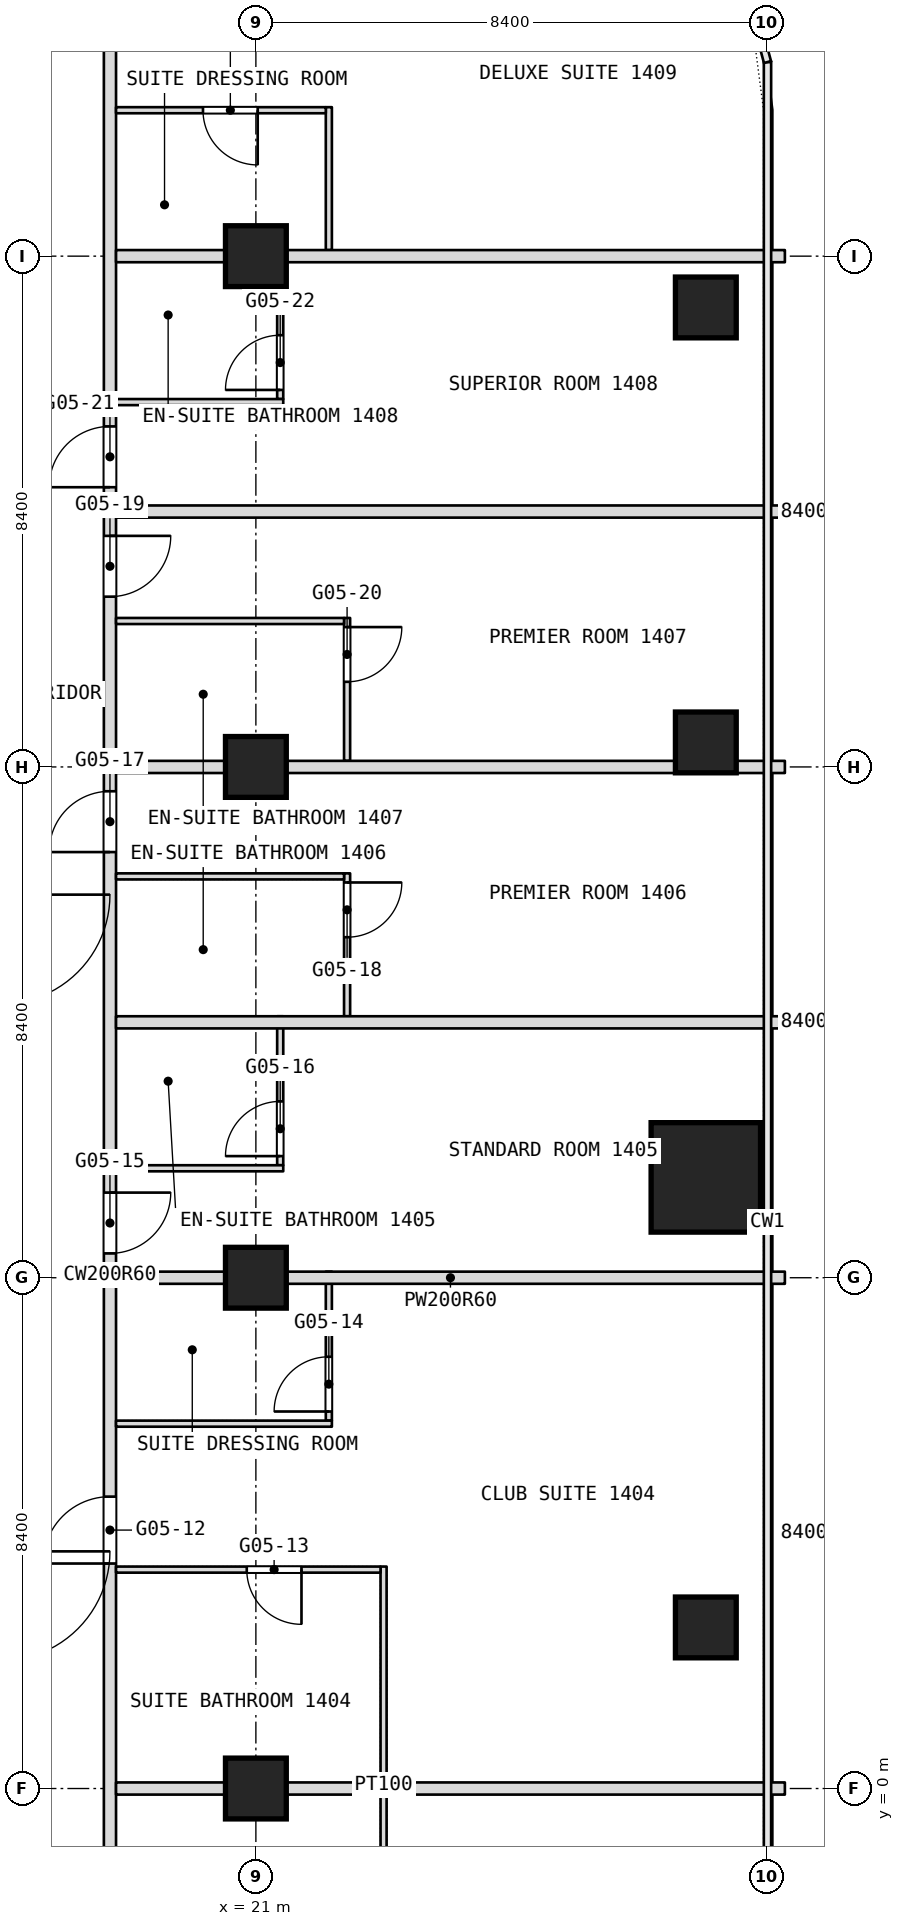
"""IFC4 building model, lengths in metres.
Left out: names, types, materials, properties, quantities, classifications, styles, units other than length and angle.
Written with IfcOpenShell. Run it as: python <this file> out.ifc"""

import sys

from ifc_helpers import new_model, si_unit, direction, frame, frame_2d, origin, origin_2d, place, context, subcontext, project, spatial, rectangle, extrude, element, fill, save


model = new_model("IFC4")
c1 = context("Model", 3, precision=1e-05, world=origin(), true_north=direction((0.0, 1.0)))
c2 = subcontext(c1, "Body", "Model", "MODEL_VIEW")
j1 = project(units=[si_unit("LENGTHUNIT", "METRE"), si_unit("PLANEANGLEUNIT", "RADIAN")], contexts=[c1])
p1 = place(None, origin())
s1 = spatial("IfcSite", under=j1, at=p1, CompositionType="ELEMENT")
p2 = place(p1, origin())
s2 = spatial("IfcBuilding", under=s1, at=p2, CompositionType="ELEMENT")
p3 = place(p2, frame((0.0, 0.0, 65.3)))
s3 = spatial("IfcBuildingStorey", under=s2, at=p3, CompositionType="ELEMENT", Elevation=65.3)
p4 = place(p3, frame((28.4, 10.05, 0.0), z_axis=(0.0, 0.0, 1.0), x_axis=(1.0, 0.0, 0.0)))
e1 = element("IfcColumn", 1, at=p4, inside=s3, PredefinedType="COLUMN", context=c2, shape_type="SweptSolid", body=[
    extrude(rectangle(XDim=1.8, YDim=1.8, at=origin_2d()), origin(), (0.0, 0.0, 1.0), 3.6),
])
for number, where, z_axis, x_axis in (
    (2, (21.0, 0.0, 0.0), (0.0, 0.0, 1.0), (1.0, 0.0, 0.0)),
    (3, (21.0, 8.4, 0.0), (0.0, 0.0, 1.0), (1.0, 0.0, 0.0)),
    (4, (21.0, 16.8, 0.0), (0.0, 0.0, 1.0), (1.0, 0.0, 0.0)),
    (5, (21.0, 25.2, 0.0), (0.0, 0.0, 1.0), (1.0, 0.0, 0.0)),
    (6, (28.4, 24.356, 0.0), (0.0, 0.0, 1.0), (1.0, 0.0, 0.0)),
    (7, (28.4, 17.203, 0.0), (0.0, 0.0, 1.0), (1.0, 0.0, 0.0)),
    (8, (28.4, 2.649, 0.0), (0.0, 0.0, 1.0), (1.0, 0.0, 0.0)),
):
    element("IfcColumn", number, at=place(p3, frame(where, z_axis=z_axis, x_axis=x_axis)), inside=s3, PredefinedType="COLUMN", context=c2, shape_type="SweptSolid", body=[
        extrude(rectangle(XDim=1.0, YDim=1.0, at=origin_2d()), origin(), (0.0, 0.0, 1.0), 3.6),
    ])
p5 = place(p3, frame((23.1, -3.55, 0.0), z_axis=(0.0, 0.0, 1.0), x_axis=(0.0, 1.0, 0.0)))
e9 = element("IfcWall", 9, at=p5, inside=s3, PredefinedType="PARTITIONING", context=c2, shape_type="SweptSolid", body=[
    extrude(rectangle(XDim=7.2, YDim=0.1, at=frame_2d((3.6, 0.0))), origin(), (0.0, 0.0, 1.0), 3.34),
])
p6 = place(p5, frame((0.15, 0.0, 0.0)))
e10 = element("IfcOpeningElement", 10, at=p6, cuts=e9, PredefinedType="OPENING", context=c2, shape_type="SweptSolid", body=[
    extrude(rectangle(XDim=0.9, YDim=2.1, at=frame_2d((0.45, 1.05))), frame((0.0, 0.05, 0.0), z_axis=(0.0, -1.0, 0.0), x_axis=(1.0, 0.0, 0.0)), (0.0, 0.0, 1.0), 0.1),
])
p7 = place(p3, frame((22.5, 12.7, 0.0), z_axis=(0.0, 0.0, 1.0), x_axis=(0.0, 1.0, 0.0)))
e11 = element("IfcWall", 11, at=p7, inside=s3, PredefinedType="PARTITIONING", context=c2, shape_type="SweptSolid", body=[
    extrude(rectangle(XDim=2.35, YDim=0.1, at=frame_2d((1.175, 0.0))), origin(), (0.0, 0.0, 1.0), 3.34),
])
p8 = place(p7, frame((1.3, 0.0, 0.0)))
e12 = element("IfcOpeningElement", 12, at=p8, cuts=e11, PredefinedType="OPENING", context=c2, shape_type="SweptSolid", body=[
    extrude(rectangle(XDim=0.9, YDim=2.1, at=frame_2d((0.45, 1.05))), frame((0.0, 0.05, 0.0), z_axis=(0.0, -1.0, 0.0), x_axis=(1.0, 0.0, 0.0)), (0.0, 0.0, 1.0), 0.1),
])
p9 = place(p3, frame((22.5, 16.9, 0.0), z_axis=(0.0, 0.0, 1.0), x_axis=(0.0, 1.0, 0.0)))
e13 = element("IfcWall", 13, at=p9, inside=s3, PredefinedType="PARTITIONING", context=c2, shape_type="SweptSolid", body=[
    extrude(rectangle(XDim=2.35, YDim=0.1, at=frame_2d((1.175, 0.0))), origin(), (0.0, 0.0, 1.0), 3.34),
])
p10 = place(p9, frame((1.3, 0.0, 0.0)))
e14 = element("IfcOpeningElement", 14, at=p10, cuts=e13, PredefinedType="OPENING", context=c2, shape_type="SweptSolid", body=[
    extrude(rectangle(XDim=0.9, YDim=2.1, at=frame_2d((0.45, 1.05))), frame((0.0, 0.05, 0.0), z_axis=(0.0, -1.0, 0.0), x_axis=(1.0, 0.0, 0.0)), (0.0, 0.0, 1.0), 0.1),
])
p11 = place(p3, frame((22.2, 6.05, 0.0), z_axis=(0.0, 0.0, 1.0), x_axis=(0.0, 1.0, 0.0)))
e15 = element("IfcWall", 15, at=p11, inside=s3, PredefinedType="PARTITIONING", context=c2, shape_type="SweptSolid", body=[
    extrude(rectangle(XDim=2.45, YDim=0.1, at=frame_2d((1.225, 0.0))), origin(), (0.0, 0.0, 1.0), 3.34),
])
p12 = place(p11, frame((0.15, 0.0, 0.0)))
e16 = element("IfcOpeningElement", 16, at=p12, cuts=e15, PredefinedType="OPENING", context=c2, shape_type="SweptSolid", body=[
    extrude(rectangle(XDim=0.9, YDim=2.1, at=frame_2d((0.45, 1.05))), frame((0.0, 0.05, 0.0), z_axis=(0.0, -1.0, 0.0), x_axis=(1.0, 0.0, 0.0)), (0.0, 0.0, 1.0), 0.1),
])
p13 = place(p3, frame((22.2, 25.3, 0.0), z_axis=(0.0, 0.0, 1.0), x_axis=(0.0, 1.0, 0.0)))
e17 = element("IfcWall", 17, at=p13, inside=s3, PredefinedType="PARTITIONING", context=c2, shape_type="SweptSolid", body=[
    extrude(rectangle(XDim=2.35, YDim=0.1, at=frame_2d((1.175, 0.0))), origin(), (0.0, 0.0, 1.0), 3.34),
])
p14 = place(p3, frame((21.4, 10.25, 0.0), z_axis=(0.0, 0.0, 1.0), x_axis=(0.0, 1.0, 0.0)))
e18 = element("IfcWall", 18, at=p14, inside=s3, PredefinedType="PARTITIONING", context=c2, shape_type="SweptSolid", body=[
    extrude(rectangle(XDim=2.45, YDim=0.1, at=frame_2d((1.225, 0.0))), origin(), (0.0, 0.0, 1.0), 3.34),
])
p15 = place(p14, frame((0.15, 0.0, 0.0)))
e19 = element("IfcOpeningElement", 19, at=p15, cuts=e18, PredefinedType="OPENING", context=c2, shape_type="SweptSolid", body=[
    extrude(rectangle(XDim=0.9, YDim=2.1, at=frame_2d((0.45, 1.05))), frame((0.0, 0.05, 0.0), z_axis=(0.0, -1.0, 0.0), x_axis=(1.0, 0.0, 0.0)), (0.0, 0.0, 1.0), 0.1),
])
p16 = place(p3, frame((21.4, 22.85, 0.0), z_axis=(0.0, 0.0, 1.0), x_axis=(0.0, 1.0, 0.0)))
e20 = element("IfcWall", 20, at=p16, inside=s3, PredefinedType="PARTITIONING", context=c2, shape_type="SweptSolid", body=[
    extrude(rectangle(XDim=2.45, YDim=0.1, at=frame_2d((1.225, 0.0))), origin(), (0.0, 0.0, 1.0), 3.34),
])
p17 = place(p16, frame((0.15, 0.0, 0.0)))
e21 = element("IfcOpeningElement", 21, at=p17, cuts=e20, PredefinedType="OPENING", context=c2, shape_type="SweptSolid", body=[
    extrude(rectangle(XDim=0.9, YDim=2.1, at=frame_2d((0.45, 1.05))), frame((0.0, 0.05, 0.0), z_axis=(0.0, -1.0, 0.0), x_axis=(1.0, 0.0, 0.0)), (0.0, 0.0, 1.0), 0.1),
])
p18 = place(p3, frame((18.6, -16.665, 0.0), z_axis=(0.0, 0.0, 1.0), x_axis=(0.0, 1.0, 0.0)))
e22 = element("IfcWall", 22, at=p18, inside=s3, PredefinedType="PARTITIONING", context=c2, shape_type="SweptSolid", body=[
    extrude(rectangle(XDim=50.205, YDim=0.2, at=frame_2d((25.103, 0.0))), origin(), (0.0, 0.0, 1.0), 3.34),
])
p19 = place(p18, frame((2.991, 0.0, 0.0)))
e23 = element("IfcOpeningElement", 23, at=p19, cuts=e22, PredefinedType="OPENING", context=c2, shape_type="SweptSolid", body=[
    extrude(rectangle(XDim=1.0, YDim=2.1, at=frame_2d((0.5, 1.05))), frame((0.0, 0.1, 0.0), z_axis=(0.0, -1.0, 0.0), x_axis=(1.0, 0.0, 0.0)), (0.0, 0.0, 1.0), 0.2),
])
p20 = place(p18, frame((4.574, 0.0, 0.0)))
e24 = element("IfcOpeningElement", 24, at=p20, cuts=e22, PredefinedType="OPENING", context=c2, shape_type="SweptSolid", body=[
    extrude(rectangle(XDim=1.0, YDim=2.1, at=frame_2d((0.5, 1.05))), frame((0.0, 0.1, 0.0), z_axis=(0.0, -1.0, 0.0), x_axis=(1.0, 0.0, 0.0)), (0.0, 0.0, 1.0), 0.2),
])
p21 = place(p18, frame((11.865, 0.0, 0.0)))
e25 = element("IfcOpeningElement", 25, at=p21, cuts=e22, PredefinedType="OPENING", context=c2, shape_type="SweptSolid", body=[
    extrude(rectangle(XDim=1.1, YDim=2.1, at=frame_2d((0.55, 1.05))), frame((0.0, 0.1, 0.0), z_axis=(0.0, -1.0, 0.0), x_axis=(1.0, 0.0, 0.0)), (0.0, 0.0, 1.0), 0.2),
])
p22 = place(p18, frame((20.365, 0.0, 0.0)))
e26 = element("IfcOpeningElement", 26, at=p22, cuts=e22, PredefinedType="OPENING", context=c2, shape_type="SweptSolid", body=[
    extrude(rectangle(XDim=1.1, YDim=2.1, at=frame_2d((0.55, 1.05))), frame((0.0, 0.1, 0.0), z_axis=(0.0, -1.0, 0.0), x_axis=(1.0, 0.0, 0.0)), (0.0, 0.0, 1.0), 0.2),
])
p23 = place(p18, frame((25.465, 0.0, 0.0)))
e27 = element("IfcOpeningElement", 27, at=p23, cuts=e22, PredefinedType="OPENING", context=c2, shape_type="SweptSolid", body=[
    extrude(rectangle(XDim=1.0, YDim=2.1, at=frame_2d((0.5, 1.05))), frame((0.0, 0.1, 0.0), z_axis=(0.0, -1.0, 0.0), x_axis=(1.0, 0.0, 0.0)), (0.0, 0.0, 1.0), 0.2),
])
p24 = place(p18, frame((32.065, 0.0, 0.0)))
e28 = element("IfcOpeningElement", 28, at=p24, cuts=e22, PredefinedType="OPENING", context=c2, shape_type="SweptSolid", body=[
    extrude(rectangle(XDim=1.0, YDim=2.1, at=frame_2d((0.5, 1.05))), frame((0.0, 0.1, 0.0), z_axis=(0.0, -1.0, 0.0), x_axis=(1.0, 0.0, 0.0)), (0.0, 0.0, 1.0), 0.2),
])
p25 = place(p18, frame((36.265, 0.0, 0.0)))
e29 = element("IfcOpeningElement", 29, at=p25, cuts=e22, PredefinedType="OPENING", context=c2, shape_type="SweptSolid", body=[
    extrude(rectangle(XDim=1.0, YDim=2.1, at=frame_2d((0.5, 1.05))), frame((0.0, 0.1, 0.0), z_axis=(0.0, -1.0, 0.0), x_axis=(1.0, 0.0, 0.0)), (0.0, 0.0, 1.0), 0.2),
])
p26 = place(p18, frame((38.065, 0.0, 0.0)))
e30 = element("IfcOpeningElement", 30, at=p26, cuts=e22, PredefinedType="OPENING", context=c2, shape_type="SweptSolid", body=[
    extrude(rectangle(XDim=1.0, YDim=2.1, at=frame_2d((0.5, 1.05))), frame((0.0, 0.1, 0.0), z_axis=(0.0, -1.0, 0.0), x_axis=(1.0, 0.0, 0.0)), (0.0, 0.0, 1.0), 0.2),
])
p27 = place(p18, frame((45.465, 0.0, 0.0)))
e31 = element("IfcOpeningElement", 31, at=p27, cuts=e22, PredefinedType="OPENING", context=c2, shape_type="SweptSolid", body=[
    extrude(rectangle(XDim=1.1, YDim=2.1, at=frame_2d((0.55, 1.05))), frame((0.0, 0.1, 0.0), z_axis=(0.0, -1.0, 0.0), x_axis=(1.0, 0.0, 0.0)), (0.0, 0.0, 1.0), 0.2),
])
p28 = place(p3, frame((18.7, 0.0, 0.0), z_axis=(0.0, 0.0, 1.0), x_axis=(1.0, 0.0, 0.0)))
e32 = element("IfcWall", 32, at=p28, inside=s3, PredefinedType="PARTITIONING", context=c2, shape_type="SweptSolid", body=[
    extrude(rectangle(XDim=11.0, YDim=0.2, at=frame_2d((5.5, 0.0))), origin(), (0.0, 0.0, 1.0), 2.84),
])
p29 = place(p3, frame((18.7, 3.6, 0.0), z_axis=(0.0, 0.0, 1.0), x_axis=(1.0, 0.0, 0.0)))
e33 = element("IfcWall", 33, at=p29, inside=s3, PredefinedType="PARTITIONING", context=c2, shape_type="SweptSolid", body=[
    extrude(rectangle(XDim=4.35, YDim=0.1, at=frame_2d((2.175, 0.0))), origin(), (0.0, 0.0, 1.0), 3.34),
])
p30 = place(p29, frame((2.15, 0.0, 0.0)))
e34 = element("IfcOpeningElement", 34, at=p30, cuts=e33, PredefinedType="OPENING", context=c2, shape_type="SweptSolid", body=[
    extrude(rectangle(XDim=0.9, YDim=2.1, at=frame_2d((0.45, 1.05))), frame((0.0, 0.05, 0.0), z_axis=(0.0, -1.0, 0.0), x_axis=(1.0, 0.0, 0.0)), (0.0, 0.0, 1.0), 0.1),
])
p31 = place(p3, frame((18.7, 6.0, 0.0), z_axis=(0.0, 0.0, 1.0), x_axis=(1.0, 0.0, 0.0)))
e35 = element("IfcWall", 35, at=p31, inside=s3, PredefinedType="PARTITIONING", context=c2, shape_type="SweptSolid", body=[
    extrude(rectangle(XDim=3.55, YDim=0.1, at=frame_2d((1.775, 0.0))), origin(), (0.0, 0.0, 1.0), 3.34),
])
p32 = place(p3, frame((18.7, 8.4, 0.0), z_axis=(0.0, 0.0, 1.0), x_axis=(1.0, 0.0, 0.0)))
e36 = element("IfcWall", 36, at=p32, inside=s3, PredefinedType="PARTITIONING", context=c2, shape_type="SweptSolid", body=[
    extrude(rectangle(XDim=11.0, YDim=0.2, at=frame_2d((5.5, 0.0))), origin(), (0.0, 0.0, 1.0), 2.84),
])
p33 = place(p3, frame((18.7, 10.2, 0.0), z_axis=(0.0, 0.0, 1.0), x_axis=(1.0, 0.0, 0.0)))
e37 = element("IfcWall", 37, at=p33, inside=s3, PredefinedType="PARTITIONING", context=c2, shape_type="SweptSolid", body=[
    extrude(rectangle(XDim=2.75, YDim=0.1, at=frame_2d((1.375, 0.0))), origin(), (0.0, 0.0, 1.0), 3.34),
])
p34 = place(p3, frame((18.7, 12.6, 0.0), z_axis=(0.0, 0.0, 1.0), x_axis=(1.0, 0.0, 0.0)))
e38 = element("IfcWall", 38, at=p34, inside=s3, PredefinedType="PARTITIONING", context=c2, shape_type="SweptSolid", body=[
    extrude(rectangle(XDim=11.0, YDim=0.2, at=frame_2d((5.5, 0.0))), origin(), (0.0, 0.0, 1.0), 3.34),
])
p35 = place(p3, frame((18.7, 15.0, 0.0), z_axis=(0.0, 0.0, 1.0), x_axis=(1.0, 0.0, 0.0)))
e39 = element("IfcWall", 39, at=p35, inside=s3, PredefinedType="PARTITIONING", context=c2, shape_type="SweptSolid", body=[
    extrude(rectangle(XDim=3.75, YDim=0.1, at=frame_2d((1.875, 0.0))), origin(), (0.0, 0.0, 1.0), 3.34),
])
p36 = place(p3, frame((18.7, 16.8, 0.0), z_axis=(0.0, 0.0, 1.0), x_axis=(1.0, 0.0, 0.0)))
e40 = element("IfcWall", 40, at=p36, inside=s3, PredefinedType="PARTITIONING", context=c2, shape_type="SweptSolid", body=[
    extrude(rectangle(XDim=11.0, YDim=0.2, at=frame_2d((5.5, 0.0))), origin(), (0.0, 0.0, 1.0), 2.84),
])
p37 = place(p3, frame((18.7, 19.2, 0.0), z_axis=(0.0, 0.0, 1.0), x_axis=(1.0, 0.0, 0.0)))
e41 = element("IfcWall", 41, at=p37, inside=s3, PredefinedType="PARTITIONING", context=c2, shape_type="SweptSolid", body=[
    extrude(rectangle(XDim=3.75, YDim=0.1, at=frame_2d((1.875, 0.0))), origin(), (0.0, 0.0, 1.0), 3.34),
])
p38 = place(p3, frame((18.7, 21.0, 0.0), z_axis=(0.0, 0.0, 1.0), x_axis=(1.0, 0.0, 0.0)))
e42 = element("IfcWall", 42, at=p38, inside=s3, PredefinedType="PARTITIONING", context=c2, shape_type="SweptSolid", body=[
    extrude(rectangle(XDim=11.0, YDim=0.2, at=frame_2d((5.5, 0.0))), origin(), (0.0, 0.0, 1.0), 3.34),
])
p39 = place(p3, frame((18.7, 22.8, 0.0), z_axis=(0.0, 0.0, 1.0), x_axis=(1.0, 0.0, 0.0)))
e43 = element("IfcWall", 43, at=p39, inside=s3, PredefinedType="PARTITIONING", context=c2, shape_type="SweptSolid", body=[
    extrude(rectangle(XDim=2.75, YDim=0.1, at=frame_2d((1.375, 0.0))), origin(), (0.0, 0.0, 1.0), 3.34),
])
p40 = place(p3, frame((18.7, 25.2, 0.0), z_axis=(0.0, 0.0, 1.0), x_axis=(1.0, 0.0, 0.0)))
e44 = element("IfcWall", 44, at=p40, inside=s3, PredefinedType="PARTITIONING", context=c2, shape_type="SweptSolid", body=[
    extrude(rectangle(XDim=11.0, YDim=0.2, at=frame_2d((5.5, 0.0))), origin(), (0.0, 0.0, 1.0), 2.84),
])
p41 = place(p3, frame((18.7, 27.6, 0.0), z_axis=(0.0, 0.0, 1.0), x_axis=(1.0, 0.0, 0.0)))
e45 = element("IfcWall", 45, at=p41, inside=s3, PredefinedType="PARTITIONING", context=c2, shape_type="SweptSolid", body=[
    extrude(rectangle(XDim=3.45, YDim=0.1, at=frame_2d((1.725, 0.0))), origin(), (0.0, 0.0, 1.0), 3.34),
])
p42 = place(p41, frame((1.43, 0.0, 0.0)))
e46 = element("IfcOpeningElement", 46, at=p42, cuts=e45, PredefinedType="OPENING", context=c2, shape_type="SweptSolid", body=[
    extrude(rectangle(XDim=0.9, YDim=2.1, at=frame_2d((0.45, 1.05))), frame((0.0, 0.05, 0.0), z_axis=(0.0, -1.0, 0.0), x_axis=(1.0, 0.0, 0.0)), (0.0, 0.0, 1.0), 0.1),
])
p43 = place(p8, origin())
e47 = element("IfcDoor", 47, at=p43, inside=s3, OperationType="SINGLE_SWING_RIGHT", PredefinedType="DOOR", context=c2, shape_type="SweptSolid", body=[
    extrude(rectangle(XDim=0.9, YDim=2.1, at=frame_2d((0.45, 1.05))), frame((0.0, 0.025, 0.0), z_axis=(0.0, -1.0, 0.0), x_axis=(1.0, 0.0, 0.0)), (0.0, 0.0, 1.0), 0.05),
])
fill(e12, e47)
p44 = place(p10, origin())
e48 = element("IfcDoor", 48, at=p44, inside=s3, OperationType="SINGLE_SWING_RIGHT", PredefinedType="DOOR", context=c2, shape_type="SweptSolid", body=[
    extrude(rectangle(XDim=0.9, YDim=2.1, at=frame_2d((0.45, 1.05))), frame((0.0, 0.025, 0.0), z_axis=(0.0, -1.0, 0.0), x_axis=(1.0, 0.0, 0.0)), (0.0, 0.0, 1.0), 0.05),
])
fill(e14, e48)
p45 = place(p12, origin())
e49 = element("IfcDoor", 49, at=p45, inside=s3, OperationType="SINGLE_SWING_LEFT", PredefinedType="DOOR", context=c2, shape_type="SweptSolid", body=[
    extrude(rectangle(XDim=0.9, YDim=2.1, at=frame_2d((0.45, 1.05))), frame((0.0, 0.025, 0.0), z_axis=(0.0, -1.0, 0.0), x_axis=(1.0, 0.0, 0.0)), (0.0, 0.0, 1.0), 0.05),
])
fill(e16, e49)
p46 = place(p15, origin())
e50 = element("IfcDoor", 50, at=p46, inside=s3, OperationType="SINGLE_SWING_LEFT", PredefinedType="DOOR", context=c2, shape_type="SweptSolid", body=[
    extrude(rectangle(XDim=0.9, YDim=2.1, at=frame_2d((0.45, 1.05))), frame((0.0, 0.025, 0.0), z_axis=(0.0, -1.0, 0.0), x_axis=(1.0, 0.0, 0.0)), (0.0, 0.0, 1.0), 0.05),
])
fill(e19, e50)
p47 = place(p17, origin())
e51 = element("IfcDoor", 51, at=p47, inside=s3, OperationType="SINGLE_SWING_LEFT", PredefinedType="DOOR", context=c2, shape_type="SweptSolid", body=[
    extrude(rectangle(XDim=0.9, YDim=2.1, at=frame_2d((0.45, 1.05))), frame((0.0, 0.025, 0.0), z_axis=(0.0, -1.0, 0.0), x_axis=(1.0, 0.0, 0.0)), (0.0, 0.0, 1.0), 0.05),
])
fill(e21, e51)
p48 = place(p22, origin())
e52 = element("IfcDoor", 52, at=p48, inside=s3, OperationType="SINGLE_SWING_RIGHT", PredefinedType="DOOR", context=c2, shape_type="SweptSolid", body=[
    extrude(rectangle(XDim=1.1, YDim=2.1, at=frame_2d((0.55, 1.05))), frame((0.0, 0.025, 0.0), z_axis=(0.0, -1.0, 0.0), x_axis=(1.0, 0.0, 0.0)), (0.0, 0.0, 1.0), 0.05),
])
fill(e26, e52)
p49 = place(p23, origin())
e53 = element("IfcDoor", 53, at=p49, inside=s3, OperationType="SINGLE_SWING_LEFT", PredefinedType="DOOR", context=c2, shape_type="SweptSolid", body=[
    extrude(rectangle(XDim=1.0, YDim=2.1, at=frame_2d((0.5, 1.05))), frame((0.0, 0.025, 0.0), z_axis=(0.0, -1.0, 0.0), x_axis=(1.0, 0.0, 0.0)), (0.0, 0.0, 1.0), 0.05),
])
fill(e27, e53)
p50 = place(p24, origin())
e54 = element("IfcDoor", 54, at=p50, inside=s3, OperationType="SINGLE_SWING_LEFT", PredefinedType="DOOR", context=c2, shape_type="SweptSolid", body=[
    extrude(rectangle(XDim=1.0, YDim=2.1, at=frame_2d((0.5, 1.05))), frame((0.0, 0.025, 0.0), z_axis=(0.0, -1.0, 0.0), x_axis=(1.0, 0.0, 0.0)), (0.0, 0.0, 1.0), 0.05),
])
fill(e28, e54)
p51 = place(p25, origin())
e55 = element("IfcDoor", 55, at=p51, inside=s3, OperationType="SINGLE_SWING_LEFT", PredefinedType="DOOR", context=c2, shape_type="SweptSolid", body=[
    extrude(rectangle(XDim=1.0, YDim=2.1, at=frame_2d((0.5, 1.05))), frame((0.0, 0.025, 0.0), z_axis=(0.0, -1.0, 0.0), x_axis=(1.0, 0.0, 0.0)), (0.0, 0.0, 1.0), 0.05),
])
fill(e29, e55)
p52 = place(p26, origin())
e56 = element("IfcDoor", 56, at=p52, inside=s3, OperationType="SINGLE_SWING_LEFT", PredefinedType="DOOR", context=c2, shape_type="SweptSolid", body=[
    extrude(rectangle(XDim=1.0, YDim=2.1, at=frame_2d((0.5, 1.05))), frame((0.0, 0.025, 0.0), z_axis=(0.0, -1.0, 0.0), x_axis=(1.0, 0.0, 0.0)), (0.0, 0.0, 1.0), 0.05),
])
fill(e30, e56)
p53 = place(p30, origin())
e57 = element("IfcDoor", 57, at=p53, inside=s3, OperationType="SINGLE_SWING_LEFT", PredefinedType="DOOR", context=c2, shape_type="SweptSolid", body=[
    extrude(rectangle(XDim=0.9, YDim=2.1, at=frame_2d((0.45, 1.05))), frame((0.0, 0.025, 0.0), z_axis=(0.0, -1.0, 0.0), x_axis=(1.0, 0.0, 0.0)), (0.0, 0.0, 1.0), 0.05),
])
fill(e34, e57)
p54 = place(p42, origin())
e58 = element("IfcDoor", 58, at=p54, inside=s3, OperationType="SINGLE_SWING_LEFT", PredefinedType="DOOR", context=c2, shape_type="SweptSolid", body=[
    extrude(rectangle(XDim=0.9, YDim=2.1, at=frame_2d((0.45, 1.05))), frame((0.0, 0.025, 0.0), z_axis=(0.0, -1.0, 0.0), x_axis=(1.0, 0.0, 0.0)), (0.0, 0.0, 1.0), 0.05),
])
fill(e46, e58)
save(model, sys.argv[1])
